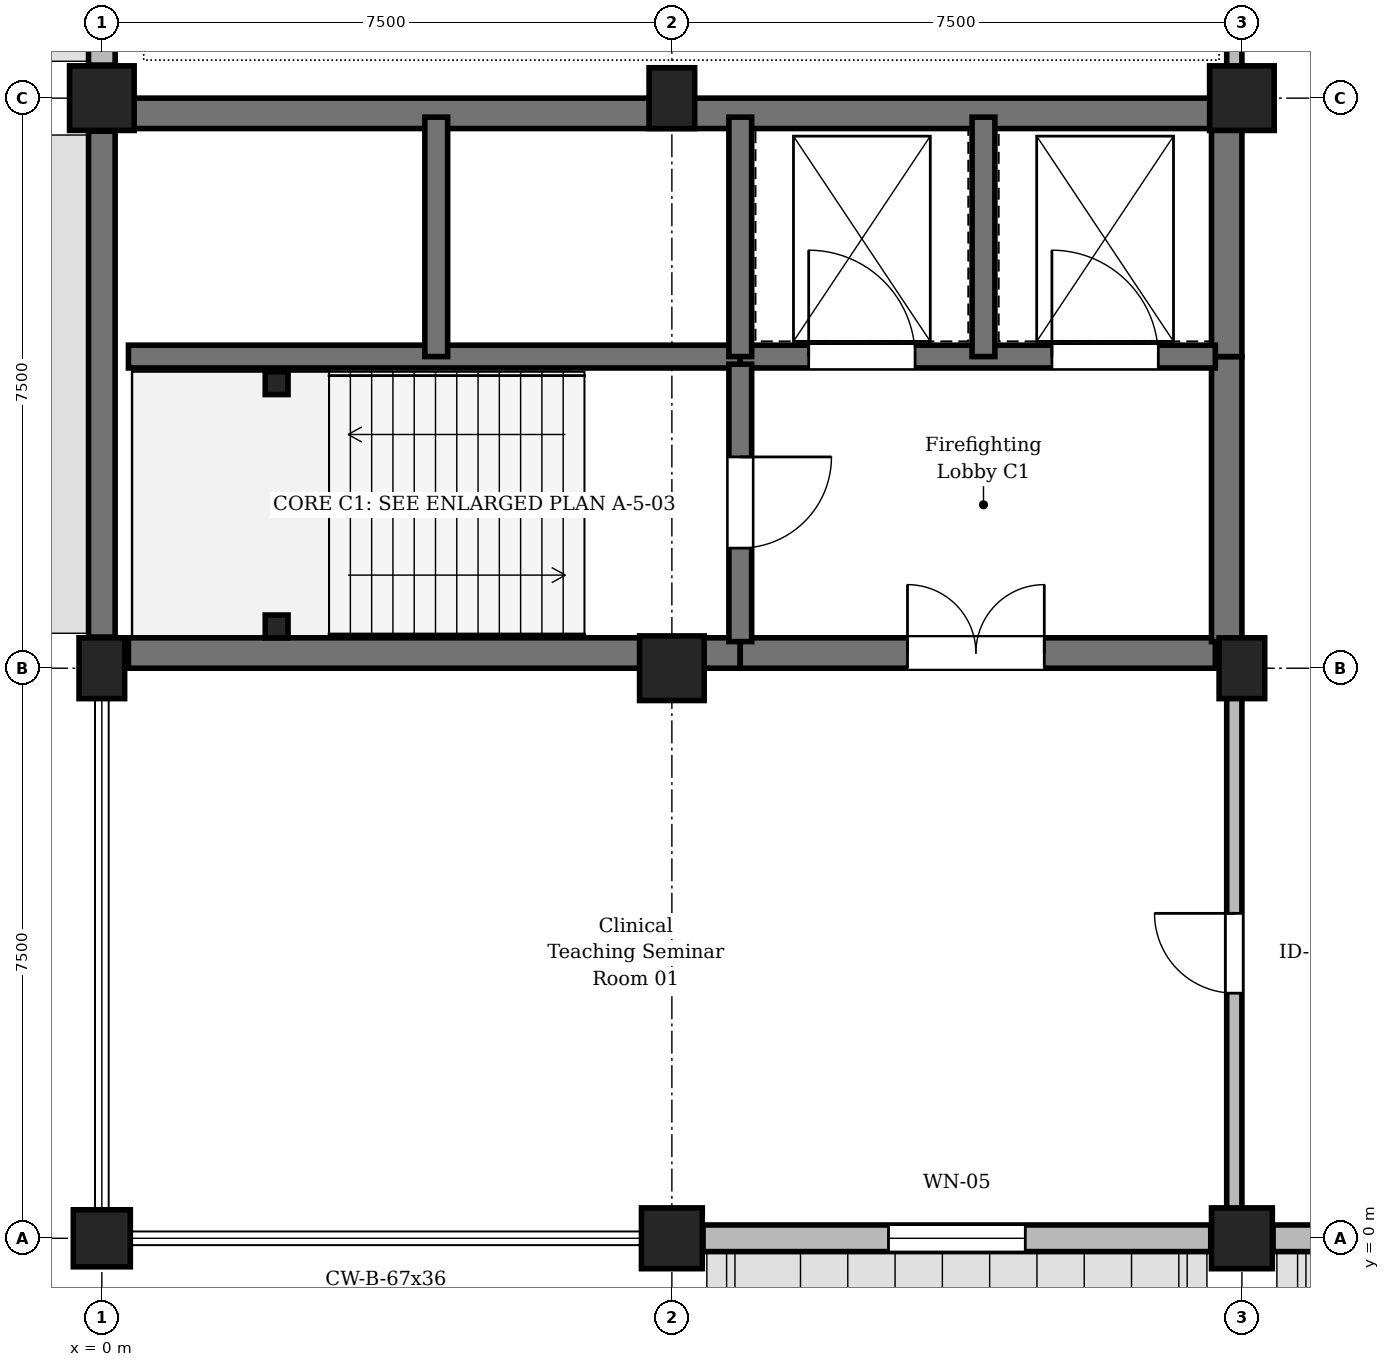
"""IFC4 building model, lengths in metres.
Left out: names, types, materials, properties, quantities, classifications, styles, units other than length and angle.
Written with IfcOpenShell. Run it as: python <this file> out.ifc"""

import sys

from ifc_helpers import new_model, si_unit, direction, frame, frame_2d, origin, origin_with_axes, origin_2d, place, context, subcontext, project, spatial, rectangle, circle, i_section, extrude, element, fill, save


model = new_model("IFC4")
c1 = context("Model", 3, precision=1e-05, world=origin(), true_north=direction((0.0, 1.0)))
c2 = subcontext(c1, "Body", "Model", "MODEL_VIEW")
j1 = project(units=[si_unit("LENGTHUNIT", "METRE"), si_unit("PLANEANGLEUNIT", "RADIAN")], contexts=[c1])
p1 = place(None, origin())
s1 = spatial("IfcSite", under=j1, at=p1, CompositionType="ELEMENT")
p2 = place(p1, origin())
s2 = spatial("IfcBuilding", under=s1, at=p2, CompositionType="ELEMENT")
p3 = place(p2, frame((0.0, 0.0, 4.8)))
s3 = spatial("IfcBuildingStorey", under=s2, at=p3, CompositionType="ELEMENT", Elevation=4.8)
p4 = place(p3, origin_with_axes())
e1 = element("IfcColumn", 1, at=p4, inside=s3, PredefinedType="COLUMN", context=c2, shape_type="SweptSolid", body=[
    extrude(circle(Radius=0.375, at=origin_2d()), origin(), (0.0, 0.0, 1.0), 4.5),
])
p5 = place(p3, frame((0.0, 7.5, 0.0), z_axis=(0.0, 0.0, 1.0), x_axis=(1.0, 0.0, 0.0)))
e2 = element("IfcColumn", 2, at=p5, inside=s3, PredefinedType="COLUMN", context=c2, shape_type="SweptSolid", body=[
    extrude(rectangle(XDim=0.6, YDim=0.8, at=origin_2d()), origin(), (0.0, 0.0, 1.0), 4.5),
])
p6 = place(p3, frame((0.0, 15.0, 0.0), z_axis=(0.0, 0.0, 1.0), x_axis=(1.0, 0.0, 0.0)))
e3 = element("IfcColumn", 3, at=p6, inside=s3, PredefinedType="COLUMN", context=c2, shape_type="SweptSolid", body=[
    extrude(rectangle(XDim=0.85, YDim=0.85, at=origin_2d()), origin(), (0.0, 0.0, 1.0), 4.5),
])
p7 = place(p3, frame((7.5, 0.0, 0.0), z_axis=(0.0, 0.0, 1.0), x_axis=(1.0, 0.0, 0.0)))
e4 = element("IfcColumn", 4, at=p7, inside=s3, PredefinedType="COLUMN", context=c2, shape_type="SweptSolid", body=[
    extrude(rectangle(XDim=0.8, YDim=0.8, at=origin_2d()), origin(), (0.0, 0.0, 1.0), 4.5),
])
p8 = place(p3, frame((7.5, 7.5, 0.0), z_axis=(0.0, 0.0, 1.0), x_axis=(1.0, 0.0, 0.0)))
e5 = element("IfcColumn", 5, at=p8, inside=s3, PredefinedType="COLUMN", context=c2, shape_type="SweptSolid", body=[
    extrude(rectangle(XDim=0.85, YDim=0.85, at=origin_2d()), origin(), (0.0, 0.0, 1.0), 4.5),
])
p9 = place(p3, frame((7.5, 15.0, 0.0), z_axis=(0.0, 0.0, 1.0), x_axis=(1.0, 0.0, 0.0)))
e6 = element("IfcColumn", 6, at=p9, inside=s3, PredefinedType="COLUMN", context=c2, shape_type="SweptSolid", body=[
    extrude(rectangle(XDim=0.6, YDim=0.8, at=origin_2d()), origin(), (0.0, 0.0, 1.0), 4.5),
])
p10 = place(p3, frame((15.0, 0.0, 0.0), z_axis=(0.0, 0.0, 1.0), x_axis=(1.0, 0.0, 0.0)))
e7 = element("IfcColumn", 7, at=p10, inside=s3, PredefinedType="COLUMN", context=c2, shape_type="SweptSolid", body=[
    extrude(rectangle(XDim=0.8, YDim=0.8, at=origin_2d()), origin(), (0.0, 0.0, 1.0), 4.5),
])
p11 = place(p3, frame((15.0, 7.5, 0.0), z_axis=(0.0, 0.0, 1.0), x_axis=(1.0, 0.0, 0.0)))
e8 = element("IfcColumn", 8, at=p11, inside=s3, PredefinedType="COLUMN", context=c2, shape_type="SweptSolid", body=[
    extrude(rectangle(XDim=0.6, YDim=0.8, at=origin_2d()), origin(), (0.0, 0.0, 1.0), 4.5),
])
p12 = place(p3, frame((15.0, 15.0, 0.0), z_axis=(0.0, 0.0, 1.0), x_axis=(1.0, 0.0, 0.0)))
e9 = element("IfcColumn", 9, at=p12, inside=s3, PredefinedType="COLUMN", context=c2, shape_type="SweptSolid", body=[
    extrude(rectangle(XDim=0.85, YDim=0.85, at=origin_2d()), origin(), (0.0, 0.0, 1.0), 4.5),
])
for number, where, z_axis, x_axis in (
    (10, (2.3, 8.05, 0.0), (0.0, 0.0, 1.0), (1.0, 0.0, 0.0)),
    (11, (2.3, 11.25, 0.0), (0.0, 0.0, 1.0), (1.0, 0.0, 0.0)),
):
    element("IfcColumn", number, at=place(p3, frame(where, z_axis=z_axis, x_axis=x_axis)), inside=s3, PredefinedType="COLUMN", context=c2, shape_type="SweptSolid", body=[
        extrude(i_section(OverallWidth=0.3, OverallDepth=0.3, WebThickness=0.011, FlangeThickness=0.019, FilletRadius=0.027, at=origin_2d()), origin(), (0.0, 0.0, 1.0), 4.5),
    ])
p13 = place(p3, frame((0.0, 7.91, 0.0), z_axis=(0.0, 0.0, 1.0), x_axis=(0.0, 1.0, 0.0)))
e12 = element("IfcWall", 12, at=p13, inside=s3, PredefinedType="SHEAR", context=c2, shape_type="SweptSolid", body=[
    extrude(rectangle(XDim=6.655, YDim=0.35, at=frame_2d((3.328, 0.0))), origin(), (0.0, 0.0, 1.0), 4.18),
])
p14 = place(p3, frame((0.0, 15.435, 0.0), z_axis=(0.0, 0.0, 1.0), x_axis=(0.0, 1.0, 0.0)))
e13 = element("IfcWall", 13, at=p14, inside=s3, PredefinedType="STANDARD", context=c2, shape_type="SweptSolid", body=[
    extrude(rectangle(XDim=6.655, YDim=0.35, at=frame_2d((3.328, 0.0))), origin(), (0.0, 0.0, 1.0), 3.63),
])
p15 = place(p14, frame((2.577, 0.0, 0.9)))
e14 = element("IfcOpeningElement", 14, at=p15, cuts=e13, PredefinedType="OPENING", context=c2, shape_type="SweptSolid", body=[
    extrude(rectangle(XDim=1.5, YDim=2.1, at=frame_2d((0.75, 1.05))), frame((0.0, 0.185, 0.0), z_axis=(0.0, -1.0, 0.0), x_axis=(1.0, 0.0, 0.0)), (0.0, 0.0, 1.0), 0.37),
])
p16 = place(p3, frame((14.59, 0.0, 0.0), z_axis=(0.0, 0.0, 1.0), x_axis=(-1.0, 0.0, 0.0)))
e15 = element("IfcWall", 15, at=p16, inside=s3, PredefinedType="STANDARD", context=c2, shape_type="SweptSolid", body=[
    extrude(rectangle(XDim=6.68, YDim=0.35, at=frame_2d((3.34, 0.0))), origin(), (0.0, 0.0, 1.0), 3.63),
])
p17 = place(p16, frame((2.44, 0.0, 0.9)))
e16 = element("IfcOpeningElement", 16, at=p17, cuts=e15, PredefinedType="OPENING", context=c2, shape_type="SweptSolid", body=[
    extrude(rectangle(XDim=1.8, YDim=2.1, at=frame_2d((0.9, 1.05))), frame((0.0, 0.185, 0.0), z_axis=(0.0, -1.0, 0.0), x_axis=(1.0, 0.0, 0.0)), (0.0, 0.0, 1.0), 0.37),
])
p18 = place(p3, frame((22.115, 0.0, 0.0), z_axis=(0.0, 0.0, 1.0), x_axis=(-1.0, 0.0, 0.0)))
e17 = element("IfcWall", 17, at=p18, inside=s3, PredefinedType="STANDARD", context=c2, shape_type="SweptSolid", body=[
    extrude(rectangle(XDim=6.705, YDim=0.35, at=frame_2d((3.353, 0.0))), origin(), (0.0, 0.0, 1.0), 3.63),
])
p19 = place(p18, frame((2.603, 0.0, 0.9)))
e18 = element("IfcOpeningElement", 18, at=p19, cuts=e17, PredefinedType="OPENING", context=c2, shape_type="SweptSolid", body=[
    extrude(rectangle(XDim=1.5, YDim=2.1, at=frame_2d((0.75, 1.05))), frame((0.0, 0.185, 0.0), z_axis=(0.0, -1.0, 0.0), x_axis=(1.0, 0.0, 0.0)), (0.0, 0.0, 1.0), 0.37),
])
p20 = place(p3, frame((0.35, 7.7, 0.0), z_axis=(0.0, 0.0, 1.0), x_axis=(1.0, 0.0, 0.0)))
e19 = element("IfcWall", 19, at=p20, inside=s3, PredefinedType="SHEAR", context=c2, shape_type="SweptSolid", body=[
    extrude(rectangle(XDim=8.05, YDim=0.4, at=frame_2d((4.025, 0.0))), origin(), (0.0, 0.0, 1.0), 4.18),
])
p21 = place(p3, frame((8.4, 7.7, 0.0), z_axis=(0.0, 0.0, 1.0), x_axis=(1.0, 0.0, 0.0)))
e20 = element("IfcWall", 20, at=p21, inside=s3, PredefinedType="SHEAR", context=c2, shape_type="SweptSolid", body=[
    extrude(rectangle(XDim=6.25, YDim=0.4, at=frame_2d((3.125, 0.0))), origin(), (0.0, 0.0, 1.0), 4.18),
])
p22 = place(p21, frame((2.2, 0.0, 0.0)))
e21 = element("IfcOpeningElement", 21, at=p22, cuts=e20, PredefinedType="OPENING", context=c2, shape_type="SweptSolid", body=[
    extrude(rectangle(XDim=1.8, YDim=2.25, at=frame_2d((0.9, 1.125))), frame((0.0, 0.21, 0.0), z_axis=(0.0, -1.0, 0.0), x_axis=(1.0, 0.0, 0.0)), (0.0, 0.0, 1.0), 0.42),
])
p23 = place(p3, frame((0.35, 14.8, 0.0), z_axis=(0.0, 0.0, 1.0), x_axis=(1.0, 0.0, 0.0)))
e22 = element("IfcWall", 22, at=p23, inside=s3, PredefinedType="SHEAR", context=c2, shape_type="SweptSolid", body=[
    extrude(rectangle(XDim=14.3, YDim=0.4, at=frame_2d((7.15, 0.0))), origin(), (0.0, 0.0, 1.0), 4.18),
])
p24 = place(p3, frame((14.8, 7.85, 0.0), z_axis=(0.0, 0.0, 1.0), x_axis=(0.0, 1.0, 0.0)))
e23 = element("IfcWall", 23, at=p24, inside=s3, PredefinedType="SHEAR", context=c2, shape_type="SweptSolid", body=[
    extrude(rectangle(XDim=3.75, YDim=0.4, at=frame_2d((1.875, 0.0))), origin(), (0.0, 0.0, 1.0), 4.18),
])
p25 = place(p3, frame((14.8, 11.6, 0.0), z_axis=(0.0, 0.0, 1.0), x_axis=(0.0, 1.0, 0.0)))
e24 = element("IfcWall", 24, at=p25, inside=s3, PredefinedType="SHEAR", context=c2, shape_type="SweptSolid", body=[
    extrude(rectangle(XDim=3.05, YDim=0.4, at=frame_2d((1.525, 0.0))), origin(), (0.0, 0.0, 1.0), 4.18),
])
p26 = place(p3, frame((0.35, 11.6, 0.0), z_axis=(0.0, 0.0, 1.0), x_axis=(1.0, 0.0, 0.0)))
e25 = element("IfcWall", 25, at=p26, inside=s3, PredefinedType="SHEAR", context=c2, shape_type="SweptSolid", body=[
    extrude(rectangle(XDim=8.05, YDim=0.3, at=frame_2d((4.025, 0.0))), origin(), (0.0, 0.0, 1.0), 4.18),
])
p27 = place(p3, frame((8.4, 11.6, 0.0), z_axis=(0.0, 0.0, 1.0), x_axis=(1.0, 0.0, 0.0)))
e26 = element("IfcWall", 26, at=p27, inside=s3, PredefinedType="SHEAR", context=c2, shape_type="SweptSolid", body=[
    extrude(rectangle(XDim=6.25, YDim=0.3, at=frame_2d((3.125, 0.0))), origin(), (0.0, 0.0, 1.0), 4.18),
])
p28 = place(p27, frame((0.9, 0.0, 0.0)))
e27 = element("IfcOpeningElement", 27, at=p28, cuts=e26, PredefinedType="OPENING", context=c2, shape_type="SweptSolid", body=[
    extrude(rectangle(XDim=1.4, YDim=2.25, at=frame_2d((0.7, 1.125))), frame((0.0, 0.16, 0.0), z_axis=(0.0, -1.0, 0.0), x_axis=(1.0, 0.0, 0.0)), (0.0, 0.0, 1.0), 0.32),
])
p29 = place(p27, frame((4.1, 0.0, 0.0)))
e28 = element("IfcOpeningElement", 28, at=p29, cuts=e26, PredefinedType="OPENING", context=c2, shape_type="SweptSolid", body=[
    extrude(rectangle(XDim=1.4, YDim=2.25, at=frame_2d((0.7, 1.125))), frame((0.0, 0.16, 0.0), z_axis=(0.0, -1.0, 0.0), x_axis=(1.0, 0.0, 0.0)), (0.0, 0.0, 1.0), 0.32),
])
p30 = place(p3, frame((8.4, 11.5, 0.0), z_axis=(0.0, 0.0, 1.0), x_axis=(0.0, -1.0, 0.0)))
e29 = element("IfcWall", 29, at=p30, inside=s3, PredefinedType="SHEAR", context=c2, shape_type="SweptSolid", body=[
    extrude(rectangle(XDim=3.65, YDim=0.3, at=frame_2d((1.825, 0.0))), origin(), (0.0, 0.0, 1.0), 4.18),
])
p31 = place(p30, frame((1.22, 0.0, 0.0)))
e30 = element("IfcOpeningElement", 30, at=p31, cuts=e29, PredefinedType="OPENING", context=c2, shape_type="SweptSolid", body=[
    extrude(rectangle(XDim=1.2, YDim=2.25, at=frame_2d((0.6, 1.125))), frame((0.0, 0.16, 0.0), z_axis=(0.0, -1.0, 0.0), x_axis=(1.0, 0.0, 0.0)), (0.0, 0.0, 1.0), 0.32),
])
for number, where, z_axis, x_axis in (
    (31, (4.4, 11.6, 0.0), (0.0, 0.0, 1.0), (0.0, 1.0, 0.0)),
    (32, (8.4, 11.6, 0.0), (0.0, 0.0, 1.0), (0.0, 1.0, 0.0)),
    (33, (11.6, 11.6, 0.0), (0.0, 0.0, 1.0), (0.0, 1.0, 0.0)),
):
    element("IfcWall", number, at=place(p3, frame(where, z_axis=z_axis, x_axis=x_axis)), inside=s3, PredefinedType="SHEAR", context=c2, shape_type="SweptSolid", body=[
        extrude(rectangle(XDim=3.15, YDim=0.3, at=frame_2d((1.575, 0.0))), origin(), (0.0, 0.0, 1.0), 4.18),
    ])
p32 = place(p3, frame((14.9, 15.3, 0.0), z_axis=(0.0, 0.0, 1.0), x_axis=(0.0, 1.0, 0.0)))
e34 = element("IfcWall", 34, at=p32, inside=s3, PredefinedType="STANDARD", context=c2, shape_type="SweptSolid", body=[
    extrude(rectangle(XDim=19.2, YDim=0.2, at=frame_2d((9.6, 0.0))), origin(), (0.0, 0.0, 1.0), 3.465),
])
p33 = place(p32, frame((10.21, 0.0, 0.0)))
e35 = element("IfcOpeningElement", 35, at=p33, cuts=e34, PredefinedType="OPENING", context=c2, shape_type="SweptSolid", body=[
    extrude(rectangle(XDim=2.1, YDim=2.4, at=frame_2d((1.05, 1.2))), frame((0.0, 0.11, 0.0), z_axis=(0.0, -1.0, 0.0), x_axis=(1.0, 0.0, 0.0)), (0.0, 0.0, 1.0), 0.22),
])
p34 = place(p3, frame((14.9, 0.35, 0.0), z_axis=(0.0, 0.0, 1.0), x_axis=(0.0, 1.0, 0.0)))
e36 = element("IfcWall", 36, at=p34, inside=s3, PredefinedType="STANDARD", context=c2, shape_type="SweptSolid", body=[
    extrude(rectangle(XDim=6.8, YDim=0.2, at=frame_2d((3.4, 0.0))), origin(), (0.0, 0.0, 1.0), 3.565),
])
p35 = place(p34, frame((2.875, 0.0, 0.0)))
e37 = element("IfcOpeningElement", 37, at=p35, cuts=e36, PredefinedType="OPENING", context=c2, shape_type="SweptSolid", body=[
    extrude(rectangle(XDim=1.05, YDim=2.2, at=frame_2d((0.525, 1.1))), frame((0.0, 0.11, 0.0), z_axis=(0.0, -1.0, 0.0), x_axis=(1.0, 0.0, 0.0)), (0.0, 0.0, 1.0), 0.22),
])
p36 = place(p17, origin())
e38 = element("IfcWindow", 38, at=p36, inside=s3, PartitioningType="SINGLE_PANEL", PredefinedType="WINDOW", context=c2, shape_type="SweptSolid", body=[
    extrude(rectangle(XDim=1.8, YDim=2.1, at=frame_2d((0.9, 1.05))), frame((0.0, 0.03, 0.0), z_axis=(0.0, -1.0, 0.0), x_axis=(1.0, 0.0, 0.0)), (0.0, 0.0, 1.0), 0.06),
])
fill(e16, e38)
p37 = place(p22, origin())
e39 = element("IfcDoor", 39, at=p37, inside=s3, OperationType="DOUBLE_DOOR_SINGLE_SWING", PredefinedType="DOOR", context=c2, shape_type="SweptSolid", body=[
    extrude(rectangle(XDim=1.8, YDim=2.25, at=frame_2d((0.9, 1.125))), frame((0.0, 0.025, 0.0), z_axis=(0.0, -1.0, 0.0), x_axis=(1.0, 0.0, 0.0)), (0.0, 0.0, 1.0), 0.05),
])
fill(e21, e39)
p38 = place(p28, origin())
e40 = element("IfcDoor", 40, at=p38, inside=s3, OperationType="DOUBLE_DOOR_SLIDING", PredefinedType="DOOR", context=c2, shape_type="SweptSolid", body=[
    extrude(rectangle(XDim=1.4, YDim=2.25, at=frame_2d((0.7, 1.125))), frame((0.0, 0.025, 0.0), z_axis=(0.0, -1.0, 0.0), x_axis=(1.0, 0.0, 0.0)), (0.0, 0.0, 1.0), 0.05),
])
fill(e27, e40)
p39 = place(p29, origin())
e41 = element("IfcDoor", 41, at=p39, inside=s3, OperationType="DOUBLE_DOOR_SLIDING", PredefinedType="DOOR", context=c2, shape_type="SweptSolid", body=[
    extrude(rectangle(XDim=1.4, YDim=2.25, at=frame_2d((0.7, 1.125))), frame((0.0, 0.025, 0.0), z_axis=(0.0, -1.0, 0.0), x_axis=(1.0, 0.0, 0.0)), (0.0, 0.0, 1.0), 0.05),
])
fill(e28, e41)
p40 = place(p31, origin())
e42 = element("IfcDoor", 42, at=p40, inside=s3, OperationType="SINGLE_SWING_LEFT", PredefinedType="DOOR", context=c2, shape_type="SweptSolid", body=[
    extrude(rectangle(XDim=1.2, YDim=2.25, at=frame_2d((0.6, 1.125))), frame((0.0, 0.025, 0.0), z_axis=(0.0, -1.0, 0.0), x_axis=(1.0, 0.0, 0.0)), (0.0, 0.0, 1.0), 0.05),
])
fill(e30, e42)
p41 = place(p35, origin())
e43 = element("IfcDoor", 43, at=p41, inside=s3, OperationType="SINGLE_SWING_RIGHT", PredefinedType="DOOR", context=c2, shape_type="SweptSolid", body=[
    extrude(rectangle(XDim=1.05, YDim=2.2, at=frame_2d((0.525, 1.1))), frame((0.0, 0.025, 0.0), z_axis=(0.0, -1.0, 0.0), x_axis=(1.0, 0.0, 0.0)), (0.0, 0.0, 1.0), 0.05),
])
fill(e37, e43)
save(model, sys.argv[1])
